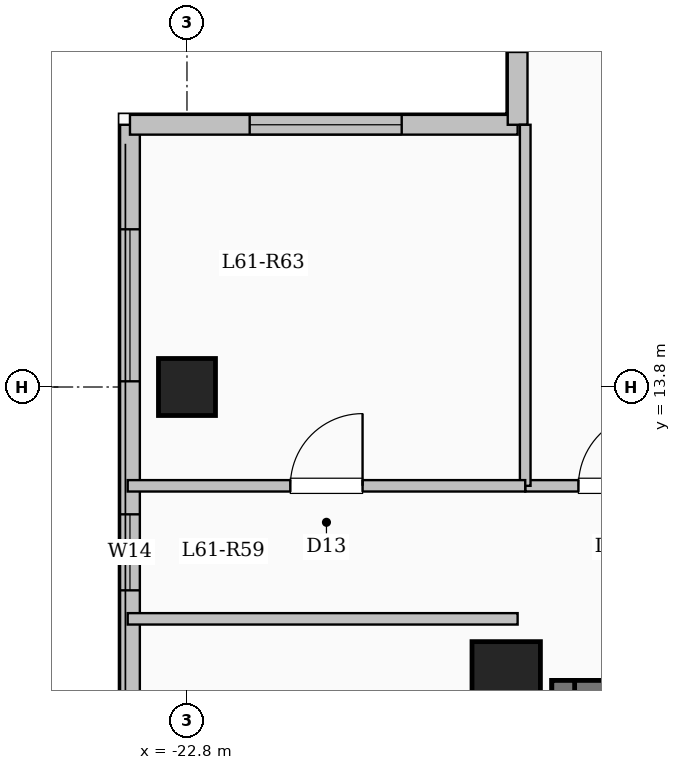
"""IFC4 building model, lengths in metres.
Left out: names, types, materials, properties, quantities, classifications, styles, units other than length and angle.
Written with IfcOpenShell. Run it as: python <this file> out.ifc"""

import sys

from ifc_helpers import new_model, si_unit, direction, frame, frame_2d, origin, origin_2d, place, context, subcontext, project, spatial, rectangle, extrude, element, fill, save


model = new_model("IFC4")
c1 = context("Model", 3, precision=1e-05, world=origin(), true_north=direction((0.0, 1.0)))
c2 = subcontext(c1, "Body", "Model", "MODEL_VIEW")
j1 = project(units=[si_unit("LENGTHUNIT", "METRE"), si_unit("PLANEANGLEUNIT", "RADIAN")], contexts=[c1])
p1 = place(None, origin())
s1 = spatial("IfcSite", under=j1, at=p1, CompositionType="ELEMENT")
p2 = place(p1, origin())
s2 = spatial("IfcBuilding", under=s1, at=p2, CompositionType="ELEMENT")
p3 = place(p2, frame((0.0, 0.0, 223.75)))
s3 = spatial("IfcBuildingStorey", under=s2, at=p3, CompositionType="ELEMENT", Elevation=223.75)
p4 = place(p3, frame((-18.6, 10.0, 0.0), z_axis=(0.0, 0.0, 1.0), x_axis=(1.0, 0.0, 0.0)))
e1 = element("IfcColumn", 1, at=p4, inside=s3, PredefinedType="COLUMN", context=c2, shape_type="SweptSolid", body=[
    extrude(rectangle(XDim=0.9, YDim=0.9, at=origin_2d()), origin(), (0.0, 0.0, 1.0), 3.35),
])
p5 = place(p3, frame((-22.8, 13.8, 0.0), z_axis=(0.0, 0.0, 1.0), x_axis=(1.0, 0.0, 0.0)))
e2 = element("IfcColumn", 2, at=p5, inside=s3, PredefinedType="COLUMN", context=c2, shape_type="SweptSolid", body=[
    extrude(rectangle(XDim=0.75, YDim=0.75, at=origin_2d()), origin(), (0.0, 0.0, 1.0), 3.35),
])
p6 = place(p3, frame((-23.55, -17.25, 0.0), z_axis=(0.0, 0.0, 1.0), x_axis=(0.0, 1.0, 0.0)))
e3 = element("IfcWall", 3, at=p6, inside=s3, PredefinedType="SOLIDWALL", context=c2, shape_type="SweptSolid", body=[
    extrude(rectangle(XDim=34.5, YDim=0.26, at=frame_2d((17.25, 0.0))), origin(), (0.0, 0.0, 1.0), 3.05),
])
p7 = place(p6, frame((2.825, 0.0, 0.9)))
e4 = element("IfcOpeningElement", 4, at=p7, cuts=e3, PredefinedType="OPENING", context=c2, shape_type="SweptSolid", body=[
    extrude(rectangle(XDim=2.2, YDim=1.75, at=frame_2d((1.1, 0.875))), frame((0.0, 0.14, 0.0), z_axis=(0.0, -1.0, 0.0), x_axis=(1.0, 0.0, 0.0)), (0.0, 0.0, 1.0), 0.28),
])
p8 = place(p6, frame((8.325, 0.0, 0.95)))
e5 = element("IfcOpeningElement", 5, at=p8, cuts=e3, PredefinedType="OPENING", context=c2, shape_type="SweptSolid", body=[
    extrude(rectangle(XDim=1.2, YDim=1.5, at=frame_2d((0.6, 0.75))), frame((0.0, 0.14, 0.0), z_axis=(0.0, -1.0, 0.0), x_axis=(1.0, 0.0, 0.0)), (0.0, 0.0, 1.0), 0.28),
])
p9 = place(p6, frame((13.25, 0.0, 0.9)))
e6 = element("IfcOpeningElement", 6, at=p9, cuts=e3, PredefinedType="OPENING", context=c2, shape_type="SweptSolid", body=[
    extrude(rectangle(XDim=2.2, YDim=1.75, at=frame_2d((1.1, 0.875))), frame((0.0, 0.14, 0.0), z_axis=(0.0, -1.0, 0.0), x_axis=(1.0, 0.0, 0.0)), (0.0, 0.0, 1.0), 0.28),
])
p10 = place(p6, frame((19.65, 0.0, 0.9)))
e7 = element("IfcOpeningElement", 7, at=p10, cuts=e3, PredefinedType="OPENING", context=c2, shape_type="SweptSolid", body=[
    extrude(rectangle(XDim=1.65, YDim=1.6, at=frame_2d((0.825, 0.8))), frame((0.0, 0.14, 0.0), z_axis=(0.0, -1.0, 0.0), x_axis=(1.0, 0.0, 0.0)), (0.0, 0.0, 1.0), 0.28),
])
p11 = place(p6, frame((24.125, 0.0, 0.9)))
e8 = element("IfcOpeningElement", 8, at=p11, cuts=e3, PredefinedType="OPENING", context=c2, shape_type="SweptSolid", body=[
    extrude(rectangle(XDim=2.0, YDim=1.7, at=frame_2d((1.0, 0.85))), frame((0.0, 0.14, 0.0), z_axis=(0.0, -1.0, 0.0), x_axis=(1.0, 0.0, 0.0)), (0.0, 0.0, 1.0), 0.28),
])
p12 = place(p6, frame((28.375, 0.0, 0.95)))
e9 = element("IfcOpeningElement", 9, at=p12, cuts=e3, PredefinedType="OPENING", context=c2, shape_type="SweptSolid", body=[
    extrude(rectangle(XDim=1.0, YDim=1.5, at=frame_2d((0.5, 0.75))), frame((0.0, 0.14, 0.0), z_axis=(0.0, -1.0, 0.0), x_axis=(1.0, 0.0, 0.0)), (0.0, 0.0, 1.0), 0.28),
])
p13 = place(p6, frame((31.125, 0.0, 0.9)))
e10 = element("IfcOpeningElement", 10, at=p13, cuts=e3, PredefinedType="OPENING", context=c2, shape_type="SweptSolid", body=[
    extrude(rectangle(XDim=2.0, YDim=1.7, at=frame_2d((1.0, 0.85))), frame((0.0, 0.14, 0.0), z_axis=(0.0, -1.0, 0.0), x_axis=(1.0, 0.0, 0.0)), (0.0, 0.0, 1.0), 0.28),
])
p14 = place(p3, frame((-23.55, 17.25, 0.0), z_axis=(0.0, 0.0, 1.0), x_axis=(1.0, 0.0, 0.0)))
e11 = element("IfcWall", 11, at=p14, inside=s3, PredefinedType="SOLIDWALL", context=c2, shape_type="SweptSolid", body=[
    extrude(rectangle(XDim=5.1, YDim=0.26, at=frame_2d((2.55, 0.0))), origin(), (0.0, 0.0, 1.0), 3.05),
])
p15 = place(p14, frame((1.575, 0.0, 0.9)))
e12 = element("IfcOpeningElement", 12, at=p15, cuts=e11, PredefinedType="OPENING", context=c2, shape_type="SweptSolid", body=[
    extrude(rectangle(XDim=2.0, YDim=1.7, at=frame_2d((1.0, 0.85))), frame((0.0, 0.14, 0.0), z_axis=(0.0, -1.0, 0.0), x_axis=(1.0, 0.0, 0.0)), (0.0, 0.0, 1.0), 0.28),
])
p16 = place(p3, frame((-18.45, 17.25, 0.0), z_axis=(0.0, 0.0, 1.0), x_axis=(0.0, 1.0, 0.0)))
e13 = element("IfcWall", 13, at=p16, inside=s3, PredefinedType="SOLIDWALL", context=c2, shape_type="SweptSolid", body=[
    extrude(rectangle(XDim=3.6, YDim=0.26, at=frame_2d((1.8, 0.0))), origin(), (0.0, 0.0, 1.0), 3.05),
])
p17 = place(p16, frame((0.958, 0.0, 0.9)))
e14 = element("IfcOpeningElement", 14, at=p17, cuts=e13, PredefinedType="OPENING", context=c2, shape_type="SweptSolid", body=[
    extrude(rectangle(XDim=1.65, YDim=1.6, at=frame_2d((0.825, 0.8))), frame((0.0, 0.14, 0.0), z_axis=(0.0, -1.0, 0.0), x_axis=(1.0, 0.0, 0.0)), (0.0, 0.0, 1.0), 0.28),
])
p18 = place(p3, frame((-18.0, 9.79, 0.0), z_axis=(0.0, 0.0, 1.0), x_axis=(1.0, 0.0, 0.0)))
e15 = element("IfcWall", 15, at=p18, inside=s3, PredefinedType="SHEAR", context=c2, shape_type="SweptSolid", body=[
    extrude(rectangle(XDim=8.0, YDim=0.3, at=frame_2d((4.0, 0.0))), origin(), (0.0, 0.0, 1.0), 3.35),
])
p19 = place(p3, frame((-17.85, 6.35, 0.0), z_axis=(0.0, 0.0, 1.0), x_axis=(0.0, 1.0, 0.0)))
e16 = element("IfcWall", 16, at=p19, inside=s3, PredefinedType="SHEAR", context=c2, shape_type="SweptSolid", body=[
    extrude(rectangle(XDim=3.59, YDim=0.3, at=frame_2d((1.795, 0.0))), origin(), (0.0, 0.0, 1.0), 3.35),
])
p20 = place(p3, frame((-18.35, 12.5, 0.0), z_axis=(0.0, 0.0, 1.0), x_axis=(1.0, 0.0, 0.0)))
e17 = element("IfcWall", 17, at=p20, inside=s3, PredefinedType="PARTITIONING", context=c2, shape_type="SweptSolid", body=[
    extrude(rectangle(XDim=14.5, YDim=0.15, at=frame_2d((7.25, 0.0))), origin(), (0.0, 0.0, 1.0), 3.05),
])
p21 = place(p20, frame((0.7, 0.0, 0.0)))
e18 = element("IfcOpeningElement", 18, at=p21, cuts=e17, PredefinedType="OPENING", context=c2, shape_type="SweptSolid", body=[
    extrude(rectangle(XDim=0.96, YDim=2.15, at=frame_2d((0.48, 1.075))), frame((0.0, 0.085, 0.0), z_axis=(0.0, -1.0, 0.0), x_axis=(1.0, 0.0, 0.0)), (0.0, 0.0, 1.0), 0.17),
])
p22 = place(p20, frame((9.205, 0.0, 0.0)))
e19 = element("IfcOpeningElement", 19, at=p22, cuts=e17, PredefinedType="OPENING", context=c2, shape_type="SweptSolid", body=[
    extrude(rectangle(XDim=0.96, YDim=2.15, at=frame_2d((0.48, 1.075))), frame((0.0, 0.085, 0.0), z_axis=(0.0, -1.0, 0.0), x_axis=(1.0, 0.0, 0.0)), (0.0, 0.0, 1.0), 0.17),
])
p23 = place(p3, frame((-23.58, 10.75, 0.0), z_axis=(0.0, 0.0, 1.0), x_axis=(1.0, 0.0, 0.0)))
e20 = element("IfcWall", 20, at=p23, inside=s3, PredefinedType="PARTITIONING", context=c2, shape_type="SweptSolid", body=[
    extrude(rectangle(XDim=5.13, YDim=0.15, at=frame_2d((2.565, 0.0))), origin(), (0.0, 0.0, 1.0), 3.05),
])
p24 = place(p3, frame((-18.35, 12.5, 0.0), z_axis=(0.0, 0.0, 1.0), x_axis=(0.0, 1.0, 0.0)))
e21 = element("IfcWall", 21, at=p24, inside=s3, PredefinedType="PARTITIONING", context=c2, shape_type="SweptSolid", body=[
    extrude(rectangle(XDim=4.75, YDim=0.14, at=frame_2d((2.375, 0.0))), origin(), (0.0, 0.0, 1.0), 3.05),
])
p25 = place(p3, frame((-23.58, 12.5, 0.0), z_axis=(0.0, 0.0, 1.0), x_axis=(1.0, 0.0, 0.0)))
e22 = element("IfcWall", 22, at=p25, inside=s3, PredefinedType="PARTITIONING", context=c2, shape_type="SweptSolid", body=[
    extrude(rectangle(XDim=5.23, YDim=0.15, at=frame_2d((2.615, 0.0))), origin(), (0.0, 0.0, 1.0), 3.05),
])
p26 = place(p25, frame((2.14, 0.0, 0.0)))
e23 = element("IfcOpeningElement", 23, at=p26, cuts=e22, PredefinedType="OPENING", context=c2, shape_type="SweptSolid", body=[
    extrude(rectangle(XDim=0.95, YDim=2.15, at=frame_2d((0.475, 1.075))), frame((0.0, 0.085, 0.0), z_axis=(0.0, -1.0, 0.0), x_axis=(1.0, 0.0, 0.0)), (0.0, 0.0, 1.0), 0.17),
])
p27 = place(p12, origin())
e24 = element("IfcWindow", 24, at=p27, inside=s3, PartitioningType="SINGLE_PANEL", PredefinedType="WINDOW", context=c2, shape_type="SweptSolid", body=[
    extrude(rectangle(XDim=1.0, YDim=1.5, at=frame_2d((0.5, 0.75))), frame((0.0, 0.03, 0.0), z_axis=(0.0, -1.0, 0.0), x_axis=(1.0, 0.0, 0.0)), (0.0, 0.0, 1.0), 0.06),
])
fill(e9, e24)
p28 = place(p13, origin())
e25 = element("IfcWindow", 25, at=p28, inside=s3, PartitioningType="SINGLE_PANEL", PredefinedType="WINDOW", context=c2, shape_type="SweptSolid", body=[
    extrude(rectangle(XDim=2.0, YDim=1.7, at=frame_2d((1.0, 0.85))), frame((0.0, 0.03, 0.0), z_axis=(0.0, -1.0, 0.0), x_axis=(1.0, 0.0, 0.0)), (0.0, 0.0, 1.0), 0.06),
])
fill(e10, e25)
p29 = place(p15, origin())
e26 = element("IfcWindow", 26, at=p29, inside=s3, PartitioningType="SINGLE_PANEL", PredefinedType="WINDOW", context=c2, shape_type="SweptSolid", body=[
    extrude(rectangle(XDim=2.0, YDim=1.7, at=frame_2d((1.0, 0.85))), frame((0.0, 0.03, 0.0), z_axis=(0.0, -1.0, 0.0), x_axis=(1.0, 0.0, 0.0)), (0.0, 0.0, 1.0), 0.06),
])
fill(e12, e26)
p30 = place(p21, origin())
e27 = element("IfcDoor", 27, at=p30, inside=s3, OperationType="SINGLE_SWING_RIGHT", PredefinedType="DOOR", context=c2, shape_type="SweptSolid", body=[
    extrude(rectangle(XDim=0.96, YDim=2.15, at=frame_2d((0.48, 1.075))), frame((0.0, 0.025, 0.0), z_axis=(0.0, -1.0, 0.0), x_axis=(1.0, 0.0, 0.0)), (0.0, 0.0, 1.0), 0.05),
])
fill(e18, e27)
p31 = place(p26, origin())
e28 = element("IfcDoor", 28, at=p31, inside=s3, OperationType="SINGLE_SWING_RIGHT", PredefinedType="DOOR", context=c2, shape_type="SweptSolid", body=[
    extrude(rectangle(XDim=0.95, YDim=2.15, at=frame_2d((0.475, 1.075))), frame((0.0, 0.025, 0.0), z_axis=(0.0, -1.0, 0.0), x_axis=(1.0, 0.0, 0.0)), (0.0, 0.0, 1.0), 0.05),
])
fill(e23, e28)
save(model, sys.argv[1])
